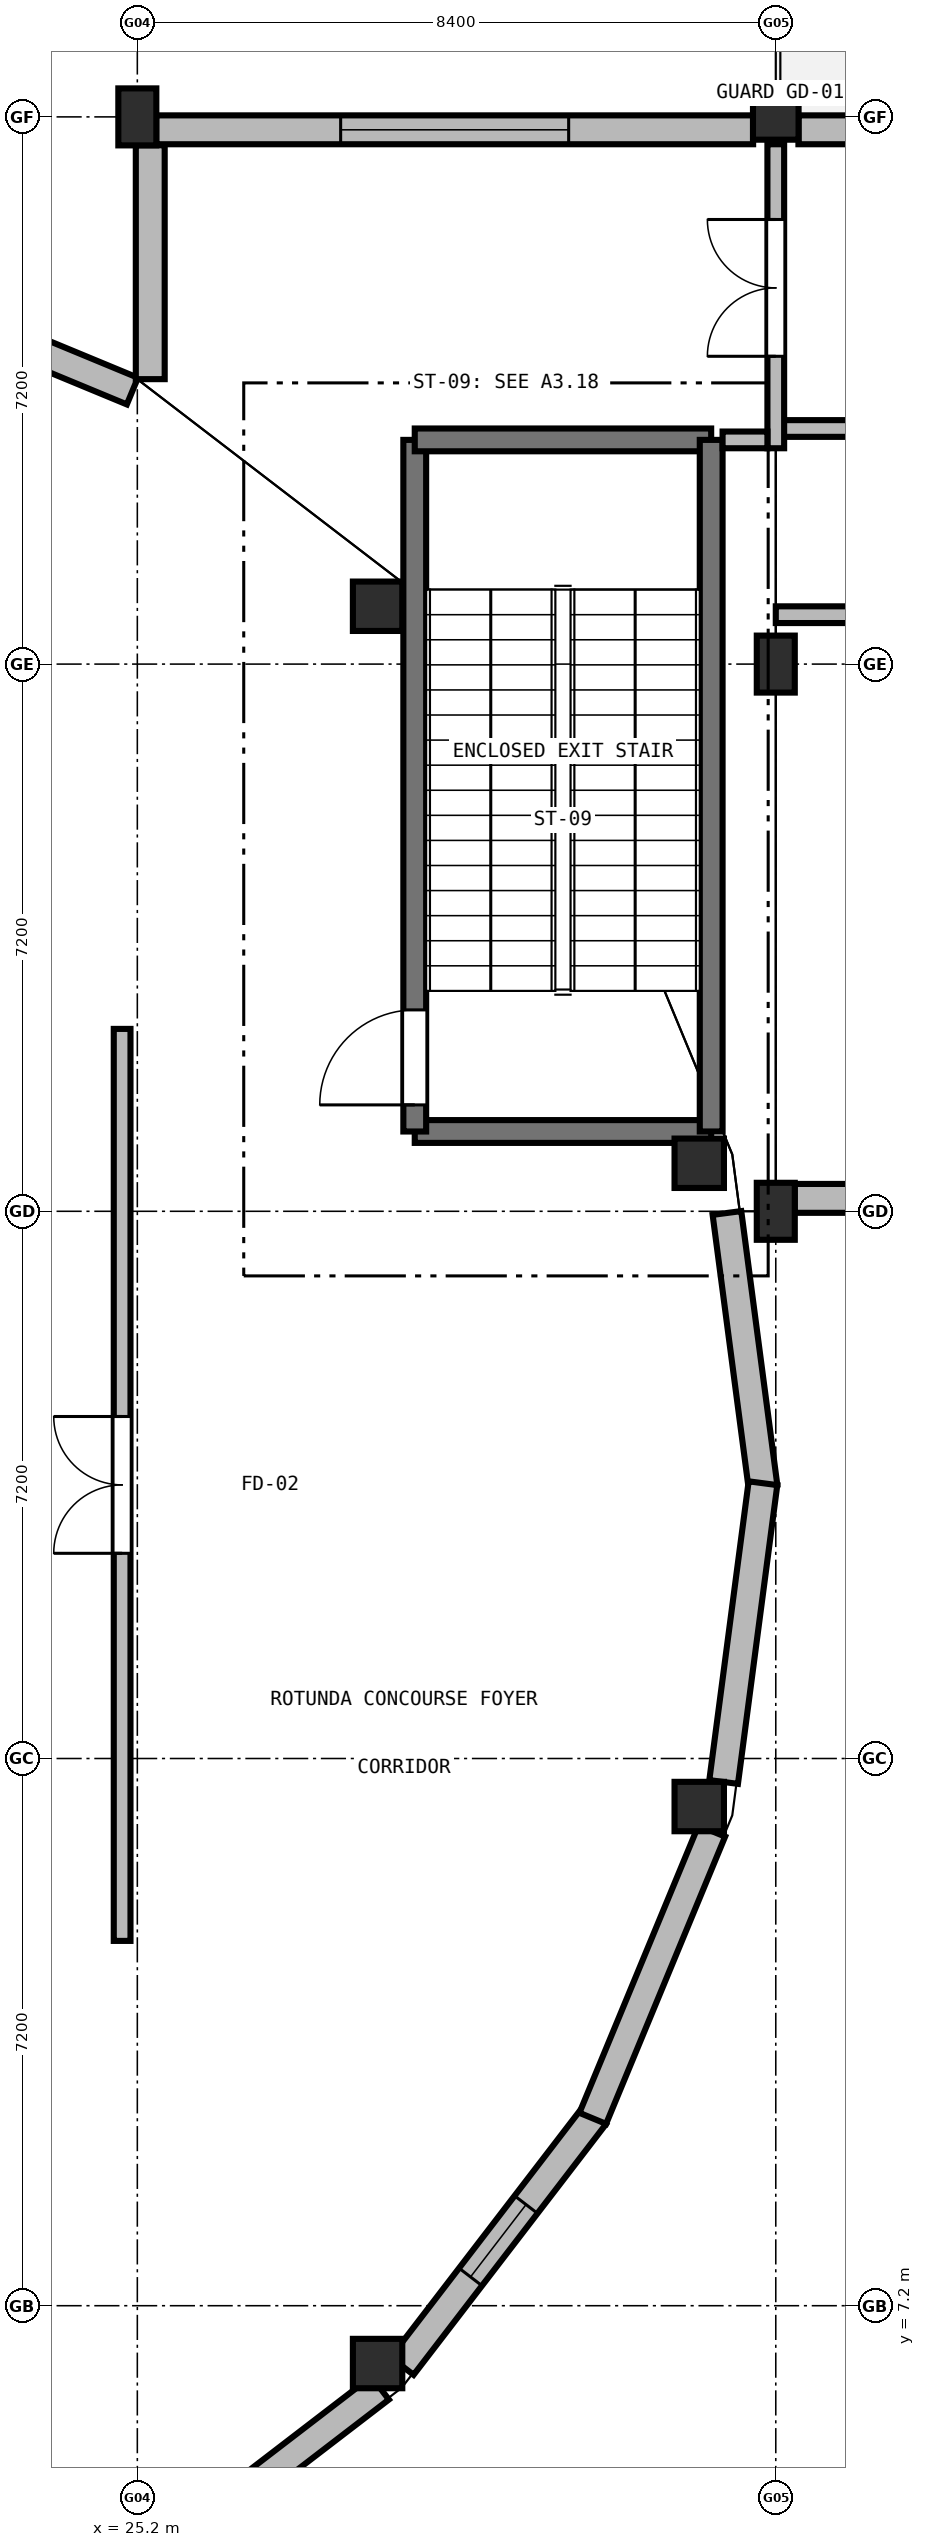
"""IFC4 building model, lengths in metres.
Left out: names, types, materials, properties, quantities, classifications, styles, units other than length and angle.
Written with IfcOpenShell. Run it as: python <this file> out.ifc"""

import sys

from ifc_helpers import new_model, si_unit, direction, frame, frame_2d, origin, origin_2d, place, context, subcontext, project, spatial, rectangle, circle, extrude, element, fill, save


model = new_model("IFC4")
c1 = context("Model", 3, precision=1e-05, world=origin(), true_north=direction((0.0, 1.0)))
c2 = subcontext(c1, "Body", "Model", "MODEL_VIEW")
j1 = project(units=[si_unit("LENGTHUNIT", "METRE"), si_unit("PLANEANGLEUNIT", "RADIAN")], contexts=[c1])
p1 = place(None, origin())
s1 = spatial("IfcSite", under=j1, at=p1, CompositionType="ELEMENT")
p2 = place(p1, origin())
s2 = spatial("IfcBuilding", under=s1, at=p2, CompositionType="ELEMENT")
p3 = place(p2, origin())
s3 = spatial("IfcBuildingStorey", under=s2, at=p3, CompositionType="ELEMENT", Elevation=0.0)
p4 = place(p3, frame((25.2, 36.0, 0.0), z_axis=(0.0, 0.0, 1.0), x_axis=(1.0, 0.0, 0.0)))
e1 = element("IfcColumn", 1, at=p4, inside=s3, PredefinedType="COLUMN", context=c2, shape_type="SweptSolid", body=[
    extrude(rectangle(XDim=0.5, YDim=0.75, at=origin_2d()), origin(), (0.0, 0.0, 1.0), 5.1),
])
for number, where, z_axis, x_axis in (
    (2, (28.361, 6.439, 0.0), (0.0, 0.0, 1.0), (1.0, 0.0, 0.0)),
    (3, (28.361, 29.561, 0.0), (0.0, 0.0, 1.0), (1.0, 0.0, 0.0)),
    (4, (32.593, 13.768, 0.0), (0.0, 0.0, 1.0), (1.0, 0.0, 0.0)),
    (5, (32.593, 22.232, 0.0), (0.0, 0.0, 1.0), (1.0, 0.0, 0.0)),
):
    element("IfcColumn", number, at=place(p3, frame(where, z_axis=z_axis, x_axis=x_axis)), inside=s3, PredefinedType="COLUMN", context=c2, shape_type="SweptSolid", body=[
        extrude(circle(Radius=0.325, at=origin_2d()), origin(), (0.0, 0.0, 1.0), 5.1),
    ])
for number, where, z_axis, x_axis in (
    (6, (33.6, 21.6, 0.0), (0.0, 0.0, 1.0), (1.0, 0.0, 0.0)),
    (7, (33.6, 28.8, 0.0), (0.0, 0.0, 1.0), (1.0, 0.0, 0.0)),
):
    element("IfcColumn", number, at=place(p3, frame(where, z_axis=z_axis, x_axis=x_axis)), inside=s3, PredefinedType="COLUMN", context=c2, shape_type="SweptSolid", body=[
        extrude(rectangle(XDim=0.5, YDim=0.75, at=origin_2d()), origin(), (0.0, 0.0, 1.0), 5.1),
    ])
p5 = place(p3, frame((33.6, 36.0, 0.0), z_axis=(0.0, 0.0, 1.0), x_axis=(1.0, 0.0, 0.0)))
e8 = element("IfcColumn", 8, at=p5, inside=s3, PredefinedType="COLUMN", context=c2, shape_type="SweptSolid", body=[
    extrude(circle(Radius=0.3, at=origin_2d()), origin(), (0.0, 0.0, 1.0), 5.1),
])
p6 = place(p3, frame((31.214, 9.704, 0.0), z_axis=(0.0, 0.0, 1.0), x_axis=(-0.608750869434, -0.793361442826, 0.0)))
e9 = element("IfcWall", 9, at=p6, inside=s3, PredefinedType="SOLIDWALL", context=c2, shape_type="SweptSolid", body=[
    extrude(rectangle(XDim=4.156, YDim=0.38, at=frame_2d((2.078, 0.0))), origin(), (0.0, 0.0, 1.0), 3.71),
])
p7 = place(p6, frame((1.478, 0.0, 0.95)))
e10 = element("IfcOpeningElement", 10, at=p7, cuts=e9, PredefinedType="OPENING", context=c2, shape_type="SweptSolid", body=[
    extrude(rectangle(XDim=1.2, YDim=1.8, at=frame_2d((0.6, 0.9))), frame((0.0, 0.2, 0.0), z_axis=(0.0, -1.0, 0.0), x_axis=(1.0, 0.0, 0.0)), (0.0, 0.0, 1.0), 0.4),
])
p8 = place(p3, frame((28.394, 6.116, 0.0), z_axis=(0.0, 0.0, 1.0), x_axis=(-0.793361442826, -0.608750869434, 0.0)))
e11 = element("IfcWall", 11, at=p8, inside=s3, PredefinedType="SOLIDWALL", context=c2, shape_type="SweptSolid", body=[
    extrude(rectangle(XDim=4.156, YDim=0.38, at=frame_2d((2.078, 0.0))), origin(), (0.0, 0.0, 1.0), 3.71),
])
p9 = place(p3, frame((21.355, 33.958, 0.0), z_axis=(0.0, 0.0, 1.0), x_axis=(0.923864101576, -0.382720683815, 0.0)))
e12 = element("IfcWall", 12, at=p9, inside=s3, PredefinedType="SOLIDWALL", context=c2, shape_type="SweptSolid", body=[
    extrude(rectangle(XDim=4.092, YDim=0.38, at=frame_2d((2.046, 0.0))), origin(), (0.0, 0.0, 1.0), 3.71),
])
p10 = place(p3, frame((25.37, 32.549, 0.0), z_axis=(0.0, 0.0, 1.0), x_axis=(0.0, 1.0, 0.0)))
e13 = element("IfcWall", 13, at=p10, inside=s3, PredefinedType="SOLIDWALL", context=c2, shape_type="SweptSolid", body=[
    extrude(rectangle(XDim=3.078, YDim=0.38, at=frame_2d((1.539, 0.0))), origin(), (0.0, 0.0, 1.0), 4.76),
])
p11 = place(p3, frame((25.448, 35.83, 0.0), z_axis=(0.0, 0.0, 1.0), x_axis=(1.0, 0.0, 0.0)))
e14 = element("IfcWall", 14, at=p11, inside=s3, PredefinedType="SOLIDWALL", context=c2, shape_type="SweptSolid", body=[
    extrude(rectangle(XDim=7.854, YDim=0.38, at=frame_2d((3.927, 0.0))), origin(), (0.0, 0.0, 1.0), 4.01),
])
p12 = place(p11, frame((2.427, 0.0, 0.95)))
e15 = element("IfcOpeningElement", 15, at=p12, cuts=e14, PredefinedType="OPENING", context=c2, shape_type="SweptSolid", body=[
    extrude(rectangle(XDim=3.0, YDim=2.1, at=frame_2d((1.5, 1.05))), frame((0.0, 0.2, 0.0), z_axis=(0.0, -1.0, 0.0), x_axis=(1.0, 0.0, 0.0)), (0.0, 0.0, 1.0), 0.4),
])
p13 = place(p3, frame((33.898, 35.83, 0.0), z_axis=(0.0, 0.0, 1.0), x_axis=(1.0, 0.0, 0.0)))
e16 = element("IfcWall", 16, at=p13, inside=s3, PredefinedType="SOLIDWALL", context=c2, shape_type="SweptSolid", body=[
    extrude(rectangle(XDim=7.804, YDim=0.38, at=frame_2d((3.902, 0.0))), origin(), (0.0, 0.0, 1.0), 3.24),
])
p14 = place(p13, frame((2.302, 0.0, 0.95)))
e17 = element("IfcOpeningElement", 17, at=p14, cuts=e16, PredefinedType="OPENING", context=c2, shape_type="SweptSolid", body=[
    extrude(rectangle(XDim=3.2, YDim=2.04, at=frame_2d((1.6, 1.02))), frame((0.0, 0.2, 0.0), z_axis=(0.0, -1.0, 0.0), x_axis=(1.0, 0.0, 0.0)), (0.0, 0.0, 1.0), 0.4),
])
p15 = place(p3, frame((41.752, 21.77, 0.0), z_axis=(0.0, 0.0, 1.0), x_axis=(-1.0, 0.0, 0.0)))
e18 = element("IfcWall", 18, at=p15, inside=s3, PredefinedType="SOLIDWALL", context=c2, shape_type="SweptSolid", body=[
    extrude(rectangle(XDim=7.904, YDim=0.38, at=frame_2d((3.952, 0.0))), origin(), (0.0, 0.0, 1.0), 4.33),
])
p16 = place(p15, frame((2.402, 0.0, 0.95)))
e19 = element("IfcOpeningElement", 19, at=p16, cuts=e18, PredefinedType="OPENING", context=c2, shape_type="SweptSolid", body=[
    extrude(rectangle(XDim=3.1, YDim=1.95, at=frame_2d((1.55, 0.975))), frame((0.0, 0.2, 0.0), z_axis=(0.0, -1.0, 0.0), x_axis=(1.0, 0.0, 0.0)), (0.0, 0.0, 1.0), 0.4),
])
p17 = place(p3, frame((32.958, 21.578, 0.0), z_axis=(0.0, 0.0, 1.0), x_axis=(0.130503210904, -0.991447886651, 0.0)))
e20 = element("IfcWall", 20, at=p17, inside=s3, PredefinedType="SOLIDWALL", context=c2, shape_type="SweptSolid", body=[
    extrude(rectangle(XDim=3.631, YDim=0.38, at=frame_2d((1.815, 0.0))), origin(), (0.0, 0.0, 1.0), 3.71),
])
p18 = place(p3, frame((33.431, 18.022, 0.0), z_axis=(0.0, 0.0, 1.0), x_axis=(-0.130534150104, -0.991443813666, 0.0)))
e21 = element("IfcWall", 21, at=p18, inside=s3, PredefinedType="SOLIDWALL", context=c2, shape_type="SweptSolid", body=[
    extrude(rectangle(XDim=3.965, YDim=0.38, at=frame_2d((1.982, 0.0))), origin(), (0.0, 0.0, 1.0), 3.71),
])
p19 = place(p3, frame((32.758, 13.445, 0.0), z_axis=(0.0, 0.0, 1.0), x_axis=(-0.3826697526, -0.923885198737, 0.0)))
e22 = element("IfcWall", 22, at=p19, inside=s3, PredefinedType="SOLIDWALL", context=c2, shape_type="SweptSolid", body=[
    extrude(rectangle(XDim=4.092, YDim=0.38, at=frame_2d((2.046, 0.0))), origin(), (0.0, 0.0, 1.0), 3.71),
])
p20 = place(p3, frame((32.75, 22.65, 0.0), z_axis=(0.0, 0.0, 1.0), x_axis=(-1.0, 0.0, 0.0)))
e23 = element("IfcWall", 23, at=p20, inside=s3, PredefinedType="SHEAR", context=c2, shape_type="SweptSolid", body=[
    extrude(rectangle(XDim=3.9, YDim=0.3, at=frame_2d((1.95, 0.0))), origin(), (0.0, 0.0, 1.0), 4.82),
])
p21 = place(p3, frame((28.85, 22.65, 0.0), z_axis=(0.0, 0.0, 1.0), x_axis=(0.0, 1.0, 0.0)))
e24 = element("IfcWall", 24, at=p21, inside=s3, PredefinedType="SHEAR", context=c2, shape_type="SweptSolid", body=[
    extrude(rectangle(XDim=9.1, YDim=0.3, at=frame_2d((4.55, 0.0))), origin(), (0.0, 0.0, 1.0), 4.82),
])
p22 = place(p21, frame((0.35, 0.0, 0.0)))
e25 = element("IfcOpeningElement", 25, at=p22, cuts=e24, PredefinedType="OPENING", context=c2, shape_type="SweptSolid", body=[
    extrude(rectangle(XDim=1.25, YDim=2.2, at=frame_2d((0.625, 1.1))), frame((0.0, 0.16, 0.0), z_axis=(0.0, -1.0, 0.0), x_axis=(1.0, 0.0, 0.0)), (0.0, 0.0, 1.0), 0.32),
])
p23 = place(p3, frame((28.85, 31.75, 0.0), z_axis=(0.0, 0.0, 1.0), x_axis=(1.0, 0.0, 0.0)))
e26 = element("IfcWall", 26, at=p23, inside=s3, PredefinedType="SHEAR", context=c2, shape_type="SweptSolid", body=[
    extrude(rectangle(XDim=3.9, YDim=0.3, at=frame_2d((1.95, 0.0))), origin(), (0.0, 0.0, 1.0), 4.82),
])
p24 = place(p3, frame((32.75, 31.75, 0.0), z_axis=(0.0, 0.0, 1.0), x_axis=(0.0, -1.0, 0.0)))
e27 = element("IfcWall", 27, at=p24, inside=s3, PredefinedType="SHEAR", context=c2, shape_type="SweptSolid", body=[
    extrude(rectangle(XDim=9.1, YDim=0.3, at=frame_2d((4.55, 0.0))), origin(), (0.0, 0.0, 1.0), 4.82),
])
p25 = place(p3, frame((33.6, 31.9, 0.0), z_axis=(0.0, 0.0, 1.0), x_axis=(1.0, 0.0, 0.0)))
e28 = element("IfcWall", 28, at=p25, inside=s3, PredefinedType="SOLIDWALL", context=c2, shape_type="SweptSolid", body=[
    extrude(rectangle(XDim=33.6, YDim=0.22, at=frame_2d((16.8, 0.0))), origin(), (0.0, 0.0, 1.0), 4.105),
])
p26 = place(p25, frame((3.6, 0.0, 0.0)))
e29 = element("IfcOpeningElement", 29, at=p26, cuts=e28, PredefinedType="OPENING", context=c2, shape_type="SweptSolid", body=[
    extrude(rectangle(XDim=1.2, YDim=2.15, at=frame_2d((0.6, 1.075))), frame((0.0, 0.12, 0.0), z_axis=(0.0, -1.0, 0.0), x_axis=(1.0, 0.0, 0.0)), (0.0, 0.0, 1.0), 0.24),
])
p27 = place(p3, frame((67.2, 29.45, 0.0), z_axis=(0.0, 0.0, 1.0), x_axis=(-1.0, 0.0, 0.0)))
e30 = element("IfcWall", 30, at=p27, inside=s3, PredefinedType="SOLIDWALL", context=c2, shape_type="SweptSolid", body=[
    extrude(rectangle(XDim=33.6, YDim=0.22, at=frame_2d((16.8, 0.0))), origin(), (0.0, 0.0, 1.0), 4.105),
])
p28 = place(p27, frame((28.75, 0.0, 0.0)))
e31 = element("IfcOpeningElement", 31, at=p28, cuts=e30, PredefinedType="OPENING", context=c2, shape_type="SweptSolid", body=[
    extrude(rectangle(XDim=1.3, YDim=2.15, at=frame_2d((0.65, 1.075))), frame((0.0, 0.12, 0.0), z_axis=(0.0, -1.0, 0.0), x_axis=(1.0, 0.0, 0.0)), (0.0, 0.0, 1.0), 0.24),
])
p29 = place(p3, frame((25.0, 12.0, 0.0), z_axis=(0.0, 0.0, 1.0), x_axis=(0.0, 1.0, 0.0)))
e32 = element("IfcWall", 32, at=p29, inside=s3, PredefinedType="SOLIDWALL", context=c2, shape_type="SweptSolid", body=[
    extrude(rectangle(XDim=12.0, YDim=0.22, at=frame_2d((6.0, 0.0))), origin(), (0.0, 0.0, 1.0), 4.75),
])
p30 = place(p29, frame((5.1, 0.0, 0.0)))
e33 = element("IfcOpeningElement", 33, at=p30, cuts=e32, PredefinedType="OPENING", context=c2, shape_type="SweptSolid", body=[
    extrude(rectangle(XDim=1.8, YDim=2.2, at=frame_2d((0.9, 1.1))), frame((0.0, 0.12, 0.0), z_axis=(0.0, -1.0, 0.0), x_axis=(1.0, 0.0, 0.0)), (0.0, 0.0, 1.0), 0.24),
])
p31 = place(p3, frame((33.6, 31.64, 0.0), z_axis=(0.0, 0.0, 1.0), x_axis=(0.0, 1.0, 0.0)))
e34 = element("IfcWall", 34, at=p31, inside=s3, PredefinedType="SOLIDWALL", context=c2, shape_type="SweptSolid", body=[
    extrude(rectangle(XDim=4.0, YDim=0.22, at=frame_2d((2.0, 0.0))), origin(), (0.0, 0.0, 1.0), 4.005),
])
p32 = place(p31, frame((1.21, 0.0, 0.0)))
e35 = element("IfcOpeningElement", 35, at=p32, cuts=e34, PredefinedType="OPENING", context=c2, shape_type="SweptSolid", body=[
    extrude(rectangle(XDim=1.8, YDim=2.2, at=frame_2d((0.9, 1.1))), frame((0.0, 0.12, 0.0), z_axis=(0.0, -1.0, 0.0), x_axis=(1.0, 0.0, 0.0)), (0.0, 0.0, 1.0), 0.24),
])
p33 = place(p3, frame((32.9, 31.75, 0.0), z_axis=(0.0, 0.0, 1.0), x_axis=(1.0, 0.0, 0.0)))
e36 = element("IfcWall", 36, at=p33, inside=s3, PredefinedType="SOLIDWALL", context=c2, shape_type="SweptSolid", body=[
    extrude(rectangle(XDim=0.59, YDim=0.22, at=frame_2d((0.295, 0.0))), origin(), (0.0, 0.0, 1.0), 4.105),
])
p34 = place(p7, origin())
e37 = element("IfcWindow", 37, at=p34, inside=s3, PartitioningType="SINGLE_PANEL", PredefinedType="WINDOW", context=c2, shape_type="SweptSolid", body=[
    extrude(rectangle(XDim=1.2, YDim=1.8, at=frame_2d((0.6, 0.9))), frame((0.0, 0.03, 0.0), z_axis=(0.0, -1.0, 0.0), x_axis=(1.0, 0.0, 0.0)), (0.0, 0.0, 1.0), 0.06),
])
fill(e10, e37)
p35 = place(p12, origin())
e38 = element("IfcWindow", 38, at=p35, inside=s3, PartitioningType="SINGLE_PANEL", PredefinedType="WINDOW", context=c2, shape_type="SweptSolid", body=[
    extrude(rectangle(XDim=3.0, YDim=2.1, at=frame_2d((1.5, 1.05))), frame((0.0, 0.03, 0.0), z_axis=(0.0, -1.0, 0.0), x_axis=(1.0, 0.0, 0.0)), (0.0, 0.0, 1.0), 0.06),
])
fill(e15, e38)
p36 = place(p22, origin())
e39 = element("IfcDoor", 39, at=p36, inside=s3, OperationType="SINGLE_SWING_LEFT", PredefinedType="DOOR", context=c2, shape_type="SweptSolid", body=[
    extrude(rectangle(XDim=1.25, YDim=2.2, at=frame_2d((0.625, 1.1))), frame((0.0, 0.025, 0.0), z_axis=(0.0, -1.0, 0.0), x_axis=(1.0, 0.0, 0.0)), (0.0, 0.0, 1.0), 0.05),
])
fill(e25, e39)
p37 = place(p30, origin())
e40 = element("IfcDoor", 40, at=p37, inside=s3, OperationType="DOUBLE_DOOR_SINGLE_SWING", PredefinedType="DOOR", context=c2, shape_type="SweptSolid", body=[
    extrude(rectangle(XDim=1.8, YDim=2.2, at=frame_2d((0.9, 1.1))), frame((0.0, 0.025, 0.0), z_axis=(0.0, -1.0, 0.0), x_axis=(1.0, 0.0, 0.0)), (0.0, 0.0, 1.0), 0.05),
])
fill(e33, e40)
p38 = place(p32, origin())
e41 = element("IfcDoor", 41, at=p38, inside=s3, OperationType="DOUBLE_DOOR_SINGLE_SWING", PredefinedType="DOOR", context=c2, shape_type="SweptSolid", body=[
    extrude(rectangle(XDim=1.8, YDim=2.2, at=frame_2d((0.9, 1.1))), frame((0.0, 0.025, 0.0), z_axis=(0.0, -1.0, 0.0), x_axis=(1.0, 0.0, 0.0)), (0.0, 0.0, 1.0), 0.05),
])
fill(e35, e41)
save(model, sys.argv[1])
